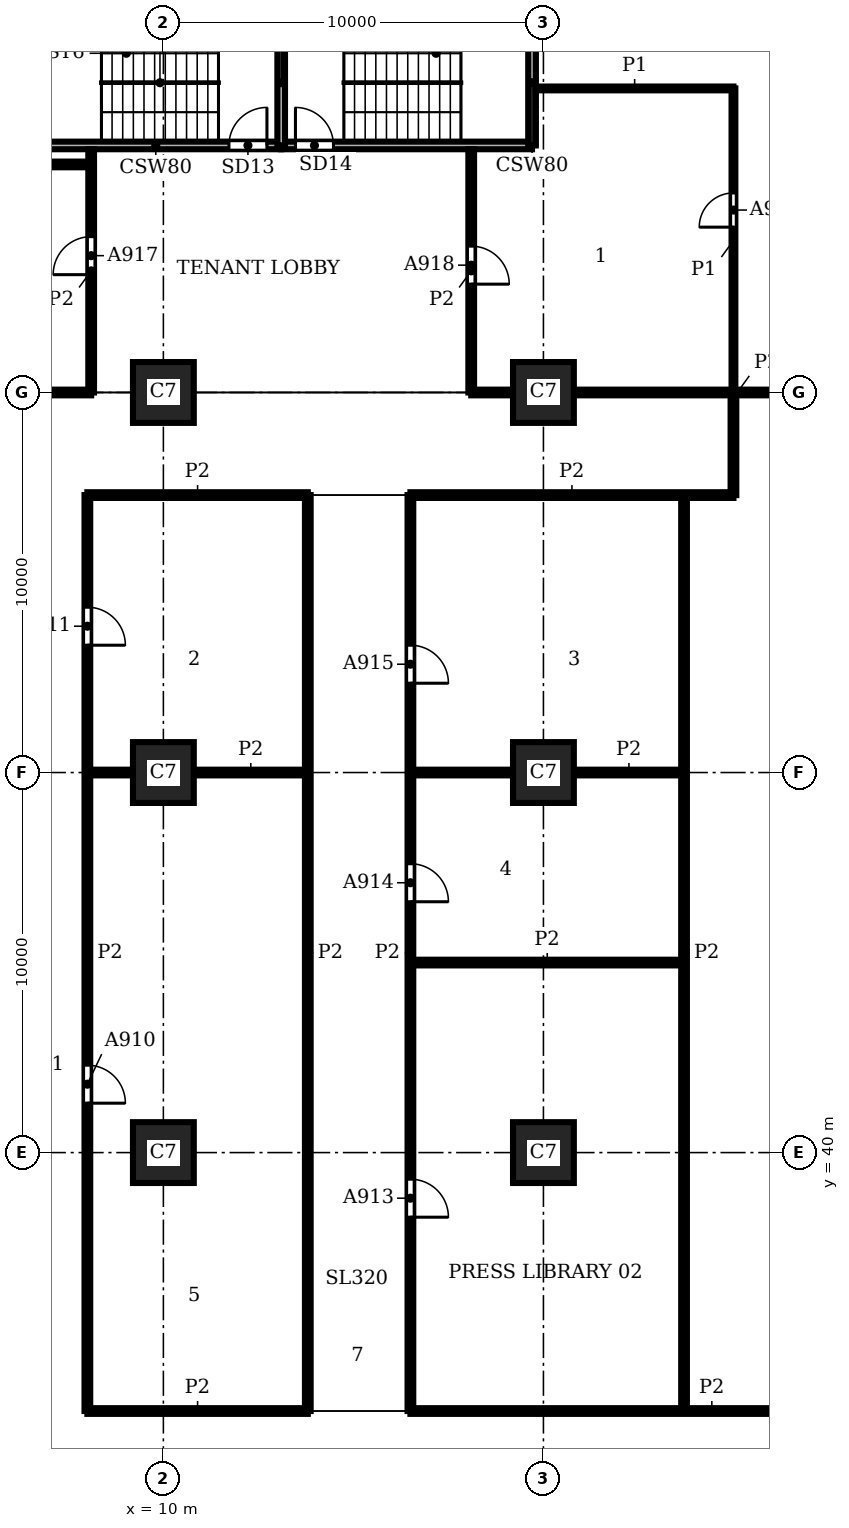
"""IFC4 building model, lengths in metres.
Left out: names, types, materials, properties, quantities, classifications, styles, units other than length and angle.
Written with IfcOpenShell. Run it as: python <this file> out.ifc"""

import sys

from ifc_helpers import new_model, si_unit, direction, frame, frame_2d, origin, origin_2d, place, context, subcontext, project, spatial, rectangle, extrude, element, fill, save


model = new_model("IFC4")
c1 = context("Model", 3, precision=1e-05, world=origin(), true_north=direction((0.0, 1.0)))
c2 = subcontext(c1, "Body", "Model", "MODEL_VIEW")
j1 = project(units=[si_unit("LENGTHUNIT", "METRE"), si_unit("PLANEANGLEUNIT", "RADIAN")], contexts=[c1])
p1 = place(None, origin())
s1 = spatial("IfcSite", under=j1, at=p1, CompositionType="ELEMENT")
p2 = place(p1, origin())
s2 = spatial("IfcBuilding", under=s1, at=p2, CompositionType="ELEMENT")
p3 = place(p2, frame((0.0, 0.0, 105.6)))
s3 = spatial("IfcBuildingStorey", under=s2, at=p3, CompositionType="ELEMENT", Elevation=105.6)
for number, where, z_axis, x_axis in (
    (1, (10.0, 40.0, 0.0), (0.0, 0.0, 1.0), (1.0, 0.0, 0.0)),
    (2, (10.0, 50.0, 0.0), (0.0, 0.0, 1.0), (1.0, 0.0, 0.0)),
    (3, (10.0, 60.0, 0.0), (0.0, 0.0, 1.0), (1.0, 0.0, 0.0)),
    (4, (20.0, 40.0, 0.0), (0.0, 0.0, 1.0), (1.0, 0.0, 0.0)),
    (5, (20.0, 50.0, 0.0), (0.0, 0.0, 1.0), (1.0, 0.0, 0.0)),
    (6, (20.0, 60.0, 0.0), (0.0, 0.0, 1.0), (1.0, 0.0, 0.0)),
):
    element("IfcColumn", number, at=place(p3, frame(where, z_axis=z_axis, x_axis=x_axis)), inside=s3, PredefinedType="COLUMN", context=c2, shape_type="SweptSolid", body=[
        extrude(rectangle(XDim=1.6, YDim=1.6, at=origin_2d()), origin(), (0.0, 0.0, 1.0), 3.9),
    ])
p4 = place(p3, frame((6.5, 66.5, 0.0), z_axis=(0.0, 0.0, 1.0), x_axis=(1.0, 0.0, 0.0)))
e7 = element("IfcWall", 7, at=p4, inside=s3, PredefinedType="SHEAR", context=c2, shape_type="SweptSolid", body=[
    extrude(rectangle(XDim=6.6, YDim=0.2, at=frame_2d((3.3, 0.0))), origin(), (0.0, 0.0, 1.0), 3.58),
])
p5 = place(p4, frame((5.225, 0.0, 0.0)))
e8 = element("IfcOpeningElement", 8, at=p5, cuts=e7, PredefinedType="OPENING", context=c2, shape_type="SweptSolid", body=[
    extrude(rectangle(XDim=1.0, YDim=2.1, at=frame_2d((0.5, 1.05))), frame((0.0, 0.11, 0.0), z_axis=(0.0, -1.0, 0.0), x_axis=(1.0, 0.0, 0.0)), (0.0, 0.0, 1.0), 0.22),
])
p6 = place(p3, frame((13.1, 66.5, 0.0), z_axis=(0.0, 0.0, 1.0), x_axis=(1.0, 0.0, 0.0)))
e9 = element("IfcWall", 9, at=p6, inside=s3, PredefinedType="SHEAR", context=c2, shape_type="SweptSolid", body=[
    extrude(rectangle(XDim=6.6, YDim=0.2, at=frame_2d((3.3, 0.0))), origin(), (0.0, 0.0, 1.0), 3.58),
])
p7 = place(p6, frame((0.375, 0.0, 0.0)))
e10 = element("IfcOpeningElement", 10, at=p7, cuts=e9, PredefinedType="OPENING", context=c2, shape_type="SweptSolid", body=[
    extrude(rectangle(XDim=1.0, YDim=2.1, at=frame_2d((0.5, 1.05))), frame((0.0, 0.11, 0.0), z_axis=(0.0, -1.0, 0.0), x_axis=(1.0, 0.0, 0.0)), (0.0, 0.0, 1.0), 0.22),
])
for number, where, z_axis, x_axis in (
    (11, (13.1, 66.5, 0.0), (0.0, 0.0, 1.0), (0.0, 1.0, 0.0)),
    (12, (19.7, 66.5, 0.0), (0.0, 0.0, 1.0), (0.0, 1.0, 0.0)),
):
    element("IfcWall", number, at=place(p3, frame(where, z_axis=z_axis, x_axis=x_axis)), inside=s3, PredefinedType="SHEAR", context=c2, shape_type="SweptSolid", body=[
        extrude(rectangle(XDim=3.3, YDim=0.2, at=frame_2d((1.65, 0.0))), origin(), (0.0, 0.0, 1.0), 3.58),
    ])
p8 = place(p3, frame((25.0, 60.0, 0.0), z_axis=(0.0, 0.0, 1.0), x_axis=(0.0, 1.0, 0.0)))
e13 = element("IfcWall", 13, at=p8, inside=s3, PredefinedType="PARTITIONING", context=c2, shape_type="SweptSolid", body=[
    extrude(rectangle(XDim=8.0, YDim=0.1, at=frame_2d((4.0, 0.0))), origin(), (0.0, 0.0, 1.0), 3.58),
])
p9 = place(p8, frame((4.35, 0.0, 0.0)))
e14 = element("IfcOpeningElement", 14, at=p9, cuts=e13, PredefinedType="OPENING", context=c2, shape_type="SweptSolid", body=[
    extrude(rectangle(XDim=0.9, YDim=2.1, at=frame_2d((0.45, 1.05))), frame((0.0, 0.06, 0.0), z_axis=(0.0, -1.0, 0.0), x_axis=(1.0, 0.0, 0.0)), (0.0, 0.0, 1.0), 0.12),
])
p10 = place(p3, frame((19.8, 68.0, 0.0), z_axis=(0.0, 0.0, 1.0), x_axis=(1.0, 0.0, 0.0)))
e15 = element("IfcWall", 15, at=p10, inside=s3, PredefinedType="PARTITIONING", context=c2, shape_type="SweptSolid", body=[
    extrude(rectangle(XDim=5.2, YDim=0.1, at=frame_2d((2.6, 0.0))), origin(), (0.0, 0.0, 1.0), 3.58),
])
p11 = place(p3, frame((8.0, 33.2, 0.0), z_axis=(0.0, 0.0, 1.0), x_axis=(0.0, 1.0, 0.0)))
e16 = element("IfcWall", 16, at=p11, inside=s3, PredefinedType="PARTITIONING", context=c2, shape_type="SweptSolid", body=[
    extrude(rectangle(XDim=24.1, YDim=0.15, at=frame_2d((12.05, 0.0))), origin(), (0.0, 0.0, 1.0), 3.58),
])
p12 = place(p11, frame((8.1, 0.0, 0.0)))
e17 = element("IfcOpeningElement", 17, at=p12, cuts=e16, PredefinedType="OPENING", context=c2, shape_type="SweptSolid", body=[
    extrude(rectangle(XDim=1.0, YDim=2.1, at=frame_2d((0.5, 1.05))), frame((0.0, 0.085, 0.0), z_axis=(0.0, -1.0, 0.0), x_axis=(1.0, 0.0, 0.0)), (0.0, 0.0, 1.0), 0.17),
])
p13 = place(p11, frame((20.15, 0.0, 0.0)))
e18 = element("IfcOpeningElement", 18, at=p13, cuts=e16, PredefinedType="OPENING", context=c2, shape_type="SweptSolid", body=[
    extrude(rectangle(XDim=1.0, YDim=2.1, at=frame_2d((0.5, 1.05))), frame((0.0, 0.085, 0.0), z_axis=(0.0, -1.0, 0.0), x_axis=(1.0, 0.0, 0.0)), (0.0, 0.0, 1.0), 0.17),
])
p14 = place(p3, frame((8.1, 60.0, 0.0), z_axis=(0.0, 0.0, 1.0), x_axis=(0.0, 1.0, 0.0)))
e19 = element("IfcWall", 19, at=p14, inside=s3, PredefinedType="PARTITIONING", context=c2, shape_type="SweptSolid", body=[
    extrude(rectangle(XDim=6.4, YDim=0.15, at=frame_2d((3.2, 0.0))), origin(), (0.0, 0.0, 1.0), 3.58),
])
p15 = place(p14, frame((3.1, 0.0, 0.0)))
e20 = element("IfcOpeningElement", 20, at=p15, cuts=e19, PredefinedType="OPENING", context=c2, shape_type="SweptSolid", body=[
    extrude(rectangle(XDim=1.0, YDim=2.1, at=frame_2d((0.5, 1.05))), frame((0.0, 0.085, 0.0), z_axis=(0.0, -1.0, 0.0), x_axis=(1.0, 0.0, 0.0)), (0.0, 0.0, 1.0), 0.17),
])
p16 = place(p3, frame((13.8, 33.2, 0.0), z_axis=(0.0, 0.0, 1.0), x_axis=(0.0, 1.0, 0.0)))
e21 = element("IfcWall", 21, at=p16, inside=s3, PredefinedType="PARTITIONING", context=c2, shape_type="SweptSolid", body=[
    extrude(rectangle(XDim=24.1, YDim=0.15, at=frame_2d((12.05, 0.0))), origin(), (0.0, 0.0, 1.0), 3.58),
])
p17 = place(p3, frame((16.5, 33.2, 0.0), z_axis=(0.0, 0.0, 1.0), x_axis=(0.0, 1.0, 0.0)))
e22 = element("IfcWall", 22, at=p17, inside=s3, PredefinedType="PARTITIONING", context=c2, shape_type="SweptSolid", body=[
    extrude(rectangle(XDim=24.1, YDim=0.15, at=frame_2d((12.05, 0.0))), origin(), (0.0, 0.0, 1.0), 3.58),
])
p18 = place(p17, frame((5.1, 0.0, 0.0)))
e23 = element("IfcOpeningElement", 23, at=p18, cuts=e22, PredefinedType="OPENING", context=c2, shape_type="SweptSolid", body=[
    extrude(rectangle(XDim=1.0, YDim=2.1, at=frame_2d((0.5, 1.05))), frame((0.0, 0.085, 0.0), z_axis=(0.0, -1.0, 0.0), x_axis=(1.0, 0.0, 0.0)), (0.0, 0.0, 1.0), 0.17),
])
p19 = place(p17, frame((13.4, 0.0, 0.0)))
e24 = element("IfcOpeningElement", 24, at=p19, cuts=e22, PredefinedType="OPENING", context=c2, shape_type="SweptSolid", body=[
    extrude(rectangle(XDim=1.0, YDim=2.1, at=frame_2d((0.5, 1.05))), frame((0.0, 0.085, 0.0), z_axis=(0.0, -1.0, 0.0), x_axis=(1.0, 0.0, 0.0)), (0.0, 0.0, 1.0), 0.17),
])
p20 = place(p17, frame((19.15, 0.0, 0.0)))
e25 = element("IfcOpeningElement", 25, at=p20, cuts=e22, PredefinedType="OPENING", context=c2, shape_type="SweptSolid", body=[
    extrude(rectangle(XDim=1.0, YDim=2.1, at=frame_2d((0.5, 1.05))), frame((0.0, 0.085, 0.0), z_axis=(0.0, -1.0, 0.0), x_axis=(1.0, 0.0, 0.0)), (0.0, 0.0, 1.0), 0.17),
])
p21 = place(p3, frame((18.1, 60.0, 0.0), z_axis=(0.0, 0.0, 1.0), x_axis=(0.0, 1.0, 0.0)))
e26 = element("IfcWall", 26, at=p21, inside=s3, PredefinedType="PARTITIONING", context=c2, shape_type="SweptSolid", body=[
    extrude(rectangle(XDim=6.4, YDim=0.15, at=frame_2d((3.2, 0.0))), origin(), (0.0, 0.0, 1.0), 3.58),
])
p22 = place(p21, frame((2.85, 0.0, 0.0)))
e27 = element("IfcOpeningElement", 27, at=p22, cuts=e26, PredefinedType="OPENING", context=c2, shape_type="SweptSolid", body=[
    extrude(rectangle(XDim=1.0, YDim=2.1, at=frame_2d((0.5, 1.05))), frame((0.0, 0.085, 0.0), z_axis=(0.0, -1.0, 0.0), x_axis=(1.0, 0.0, 0.0)), (0.0, 0.0, 1.0), 0.17),
])
p23 = place(p3, frame((23.7, 33.2, 0.0), z_axis=(0.0, 0.0, 1.0), x_axis=(0.0, 1.0, 0.0)))
e28 = element("IfcWall", 28, at=p23, inside=s3, PredefinedType="PARTITIONING", context=c2, shape_type="SweptSolid", body=[
    extrude(rectangle(XDim=24.1, YDim=0.15, at=frame_2d((12.05, 0.0))), origin(), (0.0, 0.0, 1.0), 3.58),
])
p24 = place(p3, frame((25.0, 57.3, 0.0), z_axis=(0.0, 0.0, 1.0), x_axis=(0.0, 1.0, 0.0)))
e29 = element("IfcWall", 29, at=p24, inside=s3, PredefinedType="PARTITIONING", context=c2, shape_type="SweptSolid", body=[
    extrude(rectangle(XDim=2.7, YDim=0.15, at=frame_2d((1.35, 0.0))), origin(), (0.0, 0.0, 1.0), 3.58),
])
p25 = place(p3, frame((8.0, 33.2, 0.0), z_axis=(0.0, 0.0, 1.0), x_axis=(1.0, 0.0, 0.0)))
e30 = element("IfcWall", 30, at=p25, inside=s3, PredefinedType="PARTITIONING", context=c2, shape_type="SweptSolid", body=[
    extrude(rectangle(XDim=5.8, YDim=0.15, at=frame_2d((2.9, 0.0))), origin(), (0.0, 0.0, 1.0), 3.58),
])
p26 = place(p3, frame((16.5, 33.2, 0.0), z_axis=(0.0, 0.0, 1.0), x_axis=(1.0, 0.0, 0.0)))
e31 = element("IfcWall", 31, at=p26, inside=s3, PredefinedType="PARTITIONING", context=c2, shape_type="SweptSolid", body=[
    extrude(rectangle(XDim=15.862, YDim=0.15, at=frame_2d((7.931, 0.0))), origin(), (0.0, 0.0, 1.0), 3.58),
])
p27 = place(p26, frame((10.05, 0.0, 0.0)))
e32 = element("IfcOpeningElement", 32, at=p27, cuts=e31, PredefinedType="OPENING", context=c2, shape_type="SweptSolid", body=[
    extrude(rectangle(XDim=1.8, YDim=2.1, at=frame_2d((0.9, 1.05))), frame((0.0, 0.085, 0.0), z_axis=(0.0, -1.0, 0.0), x_axis=(1.0, 0.0, 0.0)), (0.0, 0.0, 1.0), 0.17),
])
p28 = place(p3, frame((16.5, 45.0, 0.0), z_axis=(0.0, 0.0, 1.0), x_axis=(1.0, 0.0, 0.0)))
e33 = element("IfcWall", 33, at=p28, inside=s3, PredefinedType="PARTITIONING", context=c2, shape_type="SweptSolid", body=[
    extrude(rectangle(XDim=7.2, YDim=0.15, at=frame_2d((3.6, 0.0))), origin(), (0.0, 0.0, 1.0), 3.58),
])
p29 = place(p3, frame((8.0, 50.0, 0.0), z_axis=(0.0, 0.0, 1.0), x_axis=(1.0, 0.0, 0.0)))
e34 = element("IfcWall", 34, at=p29, inside=s3, PredefinedType="PARTITIONING", context=c2, shape_type="SweptSolid", body=[
    extrude(rectangle(XDim=1.2, YDim=0.15, at=frame_2d((0.6, 0.0))), origin(), (0.0, 0.0, 1.0), 3.58),
])
p30 = place(p3, frame((10.8, 50.0, 0.0), z_axis=(0.0, 0.0, 1.0), x_axis=(1.0, 0.0, 0.0)))
e35 = element("IfcWall", 35, at=p30, inside=s3, PredefinedType="PARTITIONING", context=c2, shape_type="SweptSolid", body=[
    extrude(rectangle(XDim=3.0, YDim=0.15, at=frame_2d((1.5, 0.0))), origin(), (0.0, 0.0, 1.0), 3.58),
])
p31 = place(p3, frame((16.5, 50.0, 0.0), z_axis=(0.0, 0.0, 1.0), x_axis=(1.0, 0.0, 0.0)))
e36 = element("IfcWall", 36, at=p31, inside=s3, PredefinedType="PARTITIONING", context=c2, shape_type="SweptSolid", body=[
    extrude(rectangle(XDim=2.7, YDim=0.15, at=frame_2d((1.35, 0.0))), origin(), (0.0, 0.0, 1.0), 3.58),
])
p32 = place(p3, frame((20.8, 50.0, 0.0), z_axis=(0.0, 0.0, 1.0), x_axis=(1.0, 0.0, 0.0)))
e37 = element("IfcWall", 37, at=p32, inside=s3, PredefinedType="PARTITIONING", context=c2, shape_type="SweptSolid", body=[
    extrude(rectangle(XDim=2.9, YDim=0.15, at=frame_2d((1.45, 0.0))), origin(), (0.0, 0.0, 1.0), 3.58),
])
p33 = place(p3, frame((8.0, 57.3, 0.0), z_axis=(0.0, 0.0, 1.0), x_axis=(1.0, 0.0, 0.0)))
e38 = element("IfcWall", 38, at=p33, inside=s3, PredefinedType="PARTITIONING", context=c2, shape_type="SweptSolid", body=[
    extrude(rectangle(XDim=5.8, YDim=0.15, at=frame_2d((2.9, 0.0))), origin(), (0.0, 0.0, 1.0), 3.58),
])
p34 = place(p3, frame((16.5, 57.3, 0.0), z_axis=(0.0, 0.0, 1.0), x_axis=(1.0, 0.0, 0.0)))
e39 = element("IfcWall", 39, at=p34, inside=s3, PredefinedType="PARTITIONING", context=c2, shape_type="SweptSolid", body=[
    extrude(rectangle(XDim=8.5, YDim=0.15, at=frame_2d((4.25, 0.0))), origin(), (0.0, 0.0, 1.0), 3.58),
])
p35 = place(p3, frame((0.6, 60.0, 0.0), z_axis=(0.0, 0.0, 1.0), x_axis=(1.0, 0.0, 0.0)))
e40 = element("IfcWall", 40, at=p35, inside=s3, PredefinedType="PARTITIONING", context=c2, shape_type="SweptSolid", body=[
    extrude(rectangle(XDim=7.5, YDim=0.15, at=frame_2d((3.75, 0.0))), origin(), (0.0, 0.0, 1.0), 3.58),
])
p36 = place(p3, frame((18.1, 60.0, 0.0), z_axis=(0.0, 0.0, 1.0), x_axis=(1.0, 0.0, 0.0)))
e41 = element("IfcWall", 41, at=p36, inside=s3, PredefinedType="PARTITIONING", context=c2, shape_type="SweptSolid", body=[
    extrude(rectangle(XDim=1.1, YDim=0.15, at=frame_2d((0.55, 0.0))), origin(), (0.0, 0.0, 1.0), 3.58),
])
p37 = place(p3, frame((20.8, 60.0, 0.0), z_axis=(0.0, 0.0, 1.0), x_axis=(1.0, 0.0, 0.0)))
e42 = element("IfcWall", 42, at=p37, inside=s3, PredefinedType="PARTITIONING", context=c2, shape_type="SweptSolid", body=[
    extrude(rectangle(XDim=8.6, YDim=0.15, at=frame_2d((4.3, 0.0))), origin(), (0.0, 0.0, 1.0), 3.58),
])
p38 = place(p3, frame((0.644, 66.0, 0.0), z_axis=(0.0, 0.0, 1.0), x_axis=(1.0, 0.0, 0.0)))
e43 = element("IfcWall", 43, at=p38, inside=s3, PredefinedType="PARTITIONING", context=c2, shape_type="SweptSolid", body=[
    extrude(rectangle(XDim=7.456, YDim=0.15, at=frame_2d((3.728, 0.0))), origin(), (0.0, 0.0, 1.0), 3.58),
])
p39 = place(p5, origin())
e44 = element("IfcDoor", 44, at=p39, inside=s3, OperationType="SINGLE_SWING_RIGHT", PredefinedType="DOOR", context=c2, shape_type="SweptSolid", body=[
    extrude(rectangle(XDim=1.0, YDim=2.1, at=frame_2d((0.5, 1.05))), frame((0.0, 0.025, 0.0), z_axis=(0.0, -1.0, 0.0), x_axis=(1.0, 0.0, 0.0)), (0.0, 0.0, 1.0), 0.05),
])
fill(e8, e44)
p40 = place(p7, origin())
e45 = element("IfcDoor", 45, at=p40, inside=s3, OperationType="SINGLE_SWING_LEFT", PredefinedType="DOOR", context=c2, shape_type="SweptSolid", body=[
    extrude(rectangle(XDim=1.0, YDim=2.1, at=frame_2d((0.5, 1.05))), frame((0.0, 0.025, 0.0), z_axis=(0.0, -1.0, 0.0), x_axis=(1.0, 0.0, 0.0)), (0.0, 0.0, 1.0), 0.05),
])
fill(e10, e45)
p41 = place(p12, frame((1.0, 0.0, 0.0), z_axis=(0.0, 0.0, 1.0), x_axis=(-1.0, 0.0, 0.0)))
e46 = element("IfcDoor", 46, at=p41, inside=s3, OperationType="SINGLE_SWING_RIGHT", PredefinedType="DOOR", context=c2, shape_type="SweptSolid", body=[
    extrude(rectangle(XDim=1.0, YDim=2.1, at=frame_2d((0.5, 1.05))), frame((0.0, 0.025, 0.0), z_axis=(0.0, -1.0, 0.0), x_axis=(1.0, 0.0, 0.0)), (0.0, 0.0, 1.0), 0.05),
])
fill(e17, e46)
p42 = place(p13, frame((1.0, 0.0, 0.0), z_axis=(0.0, 0.0, 1.0), x_axis=(-1.0, 0.0, 0.0)))
e47 = element("IfcDoor", 47, at=p42, inside=s3, OperationType="SINGLE_SWING_RIGHT", PredefinedType="DOOR", context=c2, shape_type="SweptSolid", body=[
    extrude(rectangle(XDim=1.0, YDim=2.1, at=frame_2d((0.5, 1.05))), frame((0.0, 0.025, 0.0), z_axis=(0.0, -1.0, 0.0), x_axis=(1.0, 0.0, 0.0)), (0.0, 0.0, 1.0), 0.05),
])
fill(e18, e47)
p43 = place(p18, frame((1.0, 0.0, 0.0), z_axis=(0.0, 0.0, 1.0), x_axis=(-1.0, 0.0, 0.0)))
e48 = element("IfcDoor", 48, at=p43, inside=s3, OperationType="SINGLE_SWING_RIGHT", PredefinedType="DOOR", context=c2, shape_type="SweptSolid", body=[
    extrude(rectangle(XDim=1.0, YDim=2.1, at=frame_2d((0.5, 1.05))), frame((0.0, 0.025, 0.0), z_axis=(0.0, -1.0, 0.0), x_axis=(1.0, 0.0, 0.0)), (0.0, 0.0, 1.0), 0.05),
])
fill(e23, e48)
p44 = place(p19, frame((1.0, 0.0, 0.0), z_axis=(0.0, 0.0, 1.0), x_axis=(-1.0, 0.0, 0.0)))
e49 = element("IfcDoor", 49, at=p44, inside=s3, OperationType="SINGLE_SWING_RIGHT", PredefinedType="DOOR", context=c2, shape_type="SweptSolid", body=[
    extrude(rectangle(XDim=1.0, YDim=2.1, at=frame_2d((0.5, 1.05))), frame((0.0, 0.025, 0.0), z_axis=(0.0, -1.0, 0.0), x_axis=(1.0, 0.0, 0.0)), (0.0, 0.0, 1.0), 0.05),
])
fill(e24, e49)
p45 = place(p20, frame((1.0, 0.0, 0.0), z_axis=(0.0, 0.0, 1.0), x_axis=(-1.0, 0.0, 0.0)))
e50 = element("IfcDoor", 50, at=p45, inside=s3, OperationType="SINGLE_SWING_RIGHT", PredefinedType="DOOR", context=c2, shape_type="SweptSolid", body=[
    extrude(rectangle(XDim=1.0, YDim=2.1, at=frame_2d((0.5, 1.05))), frame((0.0, 0.025, 0.0), z_axis=(0.0, -1.0, 0.0), x_axis=(1.0, 0.0, 0.0)), (0.0, 0.0, 1.0), 0.05),
])
fill(e25, e50)
p46 = place(p15, origin())
e51 = element("IfcDoor", 51, at=p46, inside=s3, OperationType="SINGLE_SWING_LEFT", PredefinedType="DOOR", context=c2, shape_type="SweptSolid", body=[
    extrude(rectangle(XDim=1.0, YDim=2.1, at=frame_2d((0.5, 1.05))), frame((0.0, 0.025, 0.0), z_axis=(0.0, -1.0, 0.0), x_axis=(1.0, 0.0, 0.0)), (0.0, 0.0, 1.0), 0.05),
])
fill(e20, e51)
p47 = place(p22, frame((1.0, 0.0, 0.0), z_axis=(0.0, 0.0, 1.0), x_axis=(-1.0, 0.0, 0.0)))
e52 = element("IfcDoor", 52, at=p47, inside=s3, OperationType="SINGLE_SWING_RIGHT", PredefinedType="DOOR", context=c2, shape_type="SweptSolid", body=[
    extrude(rectangle(XDim=1.0, YDim=2.1, at=frame_2d((0.5, 1.05))), frame((0.0, 0.025, 0.0), z_axis=(0.0, -1.0, 0.0), x_axis=(1.0, 0.0, 0.0)), (0.0, 0.0, 1.0), 0.05),
])
fill(e27, e52)
p48 = place(p9, origin())
e53 = element("IfcDoor", 53, at=p48, inside=s3, OperationType="SINGLE_SWING_LEFT", PredefinedType="DOOR", context=c2, shape_type="SweptSolid", body=[
    extrude(rectangle(XDim=0.9, YDim=2.1, at=frame_2d((0.45, 1.05))), frame((0.0, 0.025, 0.0), z_axis=(0.0, -1.0, 0.0), x_axis=(1.0, 0.0, 0.0)), (0.0, 0.0, 1.0), 0.05),
])
fill(e14, e53)
save(model, sys.argv[1])
